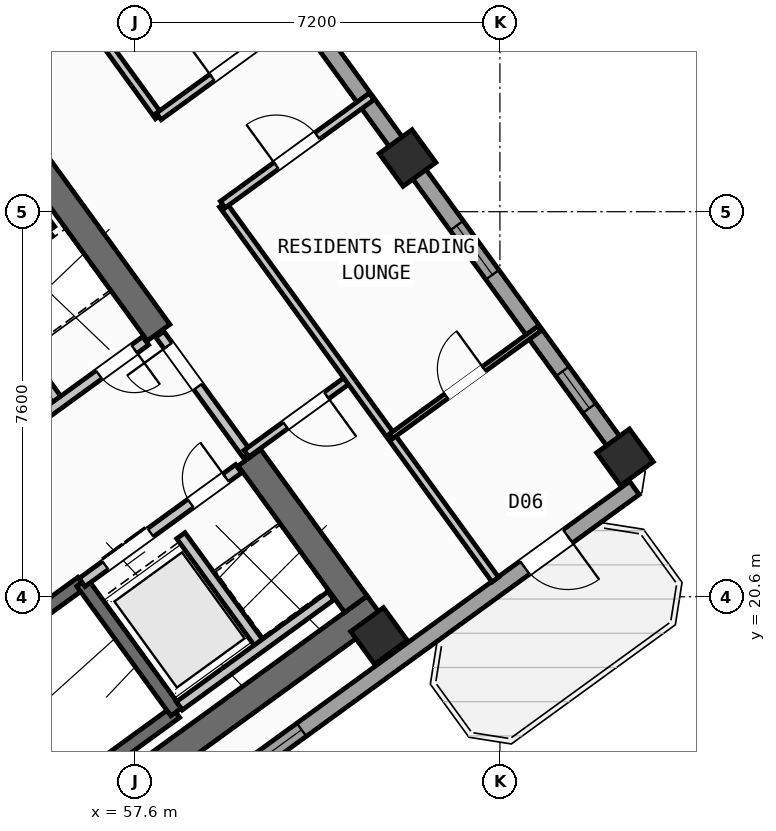
"""IFC4 building model, lengths in metres.
Left out: names, types, materials, properties, quantities, classifications, styles, units other than length and angle.
Written with IfcOpenShell. Run it as: python <this file> out.ifc"""

import sys

from ifc_helpers import new_model, si_unit, direction, frame, frame_2d, origin, origin_2d, place, context, subcontext, project, spatial, rectangle, hollow_rectangle, extrude, source, transform, mapped, element, fill, save


model = new_model("IFC4")
c1 = context("Model", 3, precision=1e-05, world=origin(), true_north=direction((0.0, 1.0)))
c2 = subcontext(c1, "Body", "Model", "MODEL_VIEW")
j1 = project(units=[si_unit("LENGTHUNIT", "METRE"), si_unit("PLANEANGLEUNIT", "RADIAN")], contexts=[c1])
p1 = place(None, origin())
s1 = spatial("IfcSite", under=j1, at=p1, CompositionType="ELEMENT")
p2 = place(p1, origin())
s2 = spatial("IfcBuilding", under=s1, at=p2, CompositionType="ELEMENT")
p3 = place(p2, frame((0.0, 0.0, 184.2)))
s3 = spatial("IfcBuildingStorey", under=s2, at=p3, CompositionType="ELEMENT", Elevation=184.2)
p4 = place(p3, frame((52.359, 13.14, 0.0), z_axis=(0.0, 0.0, 1.0), x_axis=(0.809014896919, 0.587788139183, 0.0)))
e1 = element("IfcWall", 1, at=p4, inside=s3, PredefinedType="SHEAR", context=c2, shape_type="SweptSolid", body=[
    extrude(rectangle(XDim=12.34, YDim=0.55, at=frame_2d((6.17, 0.0))), origin(), (0.0, 0.0, 1.0), 3.35),
])
p5 = place(p3, frame((61.958, 20.454, 0.0), z_axis=(0.0, 0.0, 1.0), x_axis=(-0.587802113096, 0.809004744015, 0.0)))
e2 = element("IfcWall", 2, at=p5, inside=s3, PredefinedType="SHEAR", context=c2, shape_type="SweptSolid", body=[
    extrude(rectangle(XDim=3.575, YDim=0.55, at=frame_2d((1.788, 0.0))), origin(), (0.0, 0.0, 1.0), 3.35),
])
p6 = place(p3, frame((58.064, 25.813, 0.0), z_axis=(0.0, 0.0, 1.0), x_axis=(-0.587764933797, 0.809031756236, 0.0)))
e3 = element("IfcWall", 3, at=p6, inside=s3, PredefinedType="SHEAR", context=c2, shape_type="SweptSolid", body=[
    extrude(rectangle(XDim=6.425, YDim=0.55, at=frame_2d((3.212, 0.0))), origin(), (0.0, 0.0, 1.0), 3.35),
])
m1 = source(origin(), c2, "Body", "SweptSolid", [
    extrude(hollow_rectangle(XDim=0.8, YDim=0.8, WallThickness=0.032, at=origin_2d()), origin(), (0.0, 0.0, 1.0), 3.6),
])
for number, where, z_axis, x_axis in (
    (4, (62.414, 19.827, 0.0), (0.0, 0.0, 1.0), (0.809, 0.588, 0.0)),
    (5, (67.268, 23.354, 0.0), (0.0, 0.0, 1.0), (0.809, 0.588, 0.0)),
    (6, (62.977, 29.259, 0.0), (0.0, 0.0, 1.0), (0.809, 0.588, 0.0)),
):
    element("IfcColumn", number, at=place(p3, frame(where, z_axis=z_axis, x_axis=x_axis)), inside=s3, PredefinedType="COLUMN", context=c2, shape_type="MappedRepresentation", body=[
        mapped(m1, transform((0.0, 0.0, 0.0), scale=1.0)),
    ])
p7 = place(p3, frame((54.81, 40.5, 0.0), z_axis=(0.0, 0.0, 1.0), x_axis=(0.587783625747, -0.809018176127, 0.0)))
e7 = element("IfcWall", 7, at=p7, inside=s3, PredefinedType="STANDARD", context=c2, shape_type="SweptSolid", body=[
    extrude(rectangle(XDim=21.587, YDim=0.32, at=frame_2d((10.794, 0.0))), origin(), (0.0, 0.0, 1.0), 2.825),
])
p8 = place(p7, frame((1.328, 0.0, 0.85)))
e8 = element("IfcOpeningElement", 8, at=p8, cuts=e7, PredefinedType="OPENING", context=c2, shape_type="SweptSolid", body=[
    extrude(rectangle(XDim=1.8, YDim=1.5, at=frame_2d((0.9, 0.75))), frame((0.0, 0.17, 0.0), z_axis=(0.0, -1.0, 0.0), x_axis=(1.0, 0.0, 0.0)), (0.0, 0.0, 1.0), 0.34),
])
p9 = place(p7, frame((4.695, 0.0, 1.0)))
e9 = element("IfcOpeningElement", 9, at=p9, cuts=e7, PredefinedType="OPENING", context=c2, shape_type="SweptSolid", body=[
    extrude(rectangle(XDim=0.9, YDim=1.25, at=frame_2d((0.45, 0.625))), frame((0.0, 0.17, 0.0), z_axis=(0.0, -1.0, 0.0), x_axis=(1.0, 0.0, 0.0)), (0.0, 0.0, 1.0), 0.34),
])
p10 = place(p7, frame((7.829, 0.0, 0.85)))
e10 = element("IfcOpeningElement", 10, at=p10, cuts=e7, PredefinedType="OPENING", context=c2, shape_type="SweptSolid", body=[
    extrude(rectangle(XDim=1.5, YDim=1.5, at=frame_2d((0.75, 0.75))), frame((0.0, 0.17, 0.0), z_axis=(0.0, -1.0, 0.0), x_axis=(1.0, 0.0, 0.0)), (0.0, 0.0, 1.0), 0.34),
])
p11 = place(p7, frame((15.542, 0.0, 0.95)))
e11 = element("IfcOpeningElement", 11, at=p11, cuts=e7, PredefinedType="OPENING", context=c2, shape_type="SweptSolid", body=[
    extrude(rectangle(XDim=1.2, YDim=1.4, at=frame_2d((0.6, 0.7))), frame((0.0, 0.17, 0.0), z_axis=(0.0, -1.0, 0.0), x_axis=(1.0, 0.0, 0.0)), (0.0, 0.0, 1.0), 0.34),
])
p12 = place(p7, frame((19.097, 0.0, 1.0)))
e12 = element("IfcOpeningElement", 12, at=p12, cuts=e7, PredefinedType="OPENING", context=c2, shape_type="SweptSolid", body=[
    extrude(rectangle(XDim=0.9, YDim=1.25, at=frame_2d((0.45, 0.625))), frame((0.0, 0.17, 0.0), z_axis=(0.0, -1.0, 0.0), x_axis=(1.0, 0.0, 0.0)), (0.0, 0.0, 1.0), 0.34),
])
p13 = place(p3, frame((67.454, 22.747, 0.0), z_axis=(0.0, 0.0, 1.0), x_axis=(-0.809021120468, -0.587779573171, 0.0)))
e13 = element("IfcWall", 13, at=p13, inside=s3, PredefinedType="STANDARD", context=c2, shape_type="SweptSolid", body=[
    extrude(rectangle(XDim=17.588, YDim=0.32, at=frame_2d((8.794, 0.0))), origin(), (0.0, 0.0, 1.0), 3.35),
])
p14 = place(p13, frame((1.624, 0.0, 0.0)))
e14 = element("IfcOpeningElement", 14, at=p14, cuts=e13, PredefinedType="OPENING", context=c2, shape_type="SweptSolid", body=[
    extrude(rectangle(XDim=1.05, YDim=2.15, at=frame_2d((0.525, 1.075))), frame((0.0, 0.17, 0.0), z_axis=(0.0, -1.0, 0.0), x_axis=(1.0, 0.0, 0.0)), (0.0, 0.0, 1.0), 0.34),
])
p15 = place(p13, frame((8.119, 0.0, 0.8)))
e15 = element("IfcOpeningElement", 15, at=p15, cuts=e13, PredefinedType="OPENING", context=c2, shape_type="SweptSolid", body=[
    extrude(rectangle(XDim=2.1, YDim=1.55, at=frame_2d((1.05, 0.775))), frame((0.0, 0.17, 0.0), z_axis=(0.0, -1.0, 0.0), x_axis=(1.0, 0.0, 0.0)), (0.0, 0.0, 1.0), 0.34),
])
p16 = place(p13, frame((13.369, 0.0, 0.8)))
e16 = element("IfcOpeningElement", 16, at=p16, cuts=e13, PredefinedType="OPENING", context=c2, shape_type="SweptSolid", body=[
    extrude(rectangle(XDim=2.1, YDim=1.55, at=frame_2d((1.05, 0.775))), frame((0.0, 0.17, 0.0), z_axis=(0.0, -1.0, 0.0), x_axis=(1.0, 0.0, 0.0)), (0.0, 0.0, 1.0), 0.34),
])
p17 = place(p3, frame((49.863, 23.44, 0.0), z_axis=(0.0, 0.0, 1.0), x_axis=(0.809003474932, 0.587803859759, 0.0)))
e17 = element("IfcWall", 17, at=p17, inside=s3, PredefinedType="SHEAR", context=c2, shape_type="SweptSolid", body=[
    extrude(rectangle(XDim=7.46, YDim=0.26, at=frame_2d((3.73, 0.0))), origin(), (0.0, 0.0, 1.0), 3.35),
])
p18 = place(p17, frame((0.36, 0.0, 0.0)))
e18 = element("IfcOpeningElement", 18, at=p18, cuts=e17, PredefinedType="OPENING", context=c2, shape_type="SweptSolid", body=[
    extrude(rectangle(XDim=0.86, YDim=2.05, at=frame_2d((0.43, 1.025))), frame((0.0, 0.14, 0.0), z_axis=(0.0, -1.0, 0.0), x_axis=(1.0, 0.0, 0.0)), (0.0, 0.0, 1.0), 0.28),
])
p19 = place(p3, frame((55.906, 27.831, 0.0), z_axis=(0.0, 0.0, 1.0), x_axis=(-0.587804123638, 0.809003283204, 0.0)))
e19 = element("IfcWall", 19, at=p19, inside=s3, PredefinedType="SHEAR", context=c2, shape_type="SweptSolid", body=[
    extrude(rectangle(XDim=3.16, YDim=0.26, at=frame_2d((1.58, 0.0))), origin(), (0.0, 0.0, 1.0), 3.35),
])
p20 = place(p3, frame((52.472, 14.013, 0.0), z_axis=(0.0, 0.0, 1.0), x_axis=(0.809028366311, 0.587769599847, 0.0)))
e20 = element("IfcWall", 20, at=p20, inside=s3, PredefinedType="SHEAR", context=c2, shape_type="SweptSolid", body=[
    extrude(rectangle(XDim=7.33, YDim=0.26, at=frame_2d((3.665, 0.0))), origin(), (0.0, 0.0, 1.0), 3.35),
])
p21 = place(p3, frame((50.615, 16.57, 0.0), z_axis=(0.0, 0.0, 1.0), x_axis=(0.809028366311, 0.587769599847, 0.0)))
e21 = element("IfcWall", 21, at=p21, inside=s3, PredefinedType="SHEAR", context=c2, shape_type="SweptSolid", body=[
    extrude(rectangle(XDim=7.33, YDim=0.26, at=frame_2d((3.665, 0.0))), origin(), (0.0, 0.0, 1.0), 3.35),
])
p22 = place(p21, frame((0.22, 0.0, 0.0)))
e22 = element("IfcOpeningElement", 22, at=p22, cuts=e21, PredefinedType="OPENING", context=c2, shape_type="SweptSolid", body=[
    extrude(rectangle(XDim=1.1, YDim=2.1, at=frame_2d((0.55, 1.05))), frame((0.0, 0.14, 0.0), z_axis=(0.0, -1.0, 0.0), x_axis=(1.0, 0.0, 0.0)), (0.0, 0.0, 1.0), 0.28),
])
p23 = place(p3, frame((58.41, 18.327, 0.0), z_axis=(0.0, 0.0, 1.0), x_axis=(-0.58776738483, 0.809029975545, 0.0)))
e23 = element("IfcWall", 23, at=p23, inside=s3, PredefinedType="SHEAR", context=c2, shape_type="SweptSolid", body=[
    extrude(rectangle(XDim=3.16, YDim=0.26, at=frame_2d((1.58, 0.0))), origin(), (0.0, 0.0, 1.0), 3.35),
])
p24 = place(p3, frame((56.553, 20.884, 0.0), z_axis=(0.0, 0.0, 1.0), x_axis=(0.809023564264, 0.58777620951, 0.0)))
e24 = element("IfcWall", 24, at=p24, inside=s3, PredefinedType="STANDARD", context=c2, shape_type="SweptSolid", body=[
    extrude(rectangle(XDim=3.818, YDim=0.2, at=frame_2d((1.909, 0.0))), origin(), (0.0, 0.0, 1.0), 3.34),
])
p25 = place(p24, frame((0.57, 0.0, 0.0)))
e25 = element("IfcOpeningElement", 25, at=p25, cuts=e24, PredefinedType="OPENING", context=c2, shape_type="SweptSolid", body=[
    extrude(rectangle(XDim=1.1, YDim=2.15, at=frame_2d((0.55, 1.075))), frame((0.0, 0.11, 0.0), z_axis=(0.0, -1.0, 0.0), x_axis=(1.0, 0.0, 0.0)), (0.0, 0.0, 1.0), 0.22),
])
p26 = place(p24, frame((2.65, 0.0, 0.0)))
e26 = element("IfcOpeningElement", 26, at=p26, cuts=e24, PredefinedType="OPENING", context=c2, shape_type="SweptSolid", body=[
    extrude(rectangle(XDim=0.86, YDim=2.05, at=frame_2d((0.43, 1.025))), frame((0.0, 0.11, 0.0), z_axis=(0.0, -1.0, 0.0), x_axis=(1.0, 0.0, 0.0)), (0.0, 0.0, 1.0), 0.22),
])
p27 = place(p3, frame((60.067, 19.655, 0.0), z_axis=(0.0, 0.0, 1.0), x_axis=(-0.587800520745, 0.809005900975, 0.0)))
e27 = element("IfcWall", 27, at=p27, inside=s3, PredefinedType="STANDARD", context=c2, shape_type="SweptSolid", body=[
    extrude(rectangle(XDim=2.66, YDim=0.2, at=frame_2d((1.33, 0.0))), origin(), (0.0, 0.0, 1.0), 3.34),
])
p28 = place(p3, frame((58.472, 18.447, 0.0), z_axis=(0.0, 0.0, 1.0), x_axis=(0.809018631237, 0.587782999339, 0.0)))
e28 = element("IfcWall", 28, at=p28, inside=s3, PredefinedType="STANDARD", context=c2, shape_type="SweptSolid", body=[
    extrude(rectangle(XDim=3.698, YDim=0.2, at=frame_2d((1.849, 0.0))), origin(), (0.0, 0.0, 1.0), 3.34),
])
p29 = place(p3, frame((56.111, 24.419, 0.0), z_axis=(0.0, 0.0, 1.0), x_axis=(-0.58777848983, 0.809021907548, 0.0)))
e29 = element("IfcWall", 29, at=p29, inside=s3, PredefinedType="STANDARD", context=c2, shape_type="SweptSolid", body=[
    extrude(rectangle(XDim=2.88, YDim=0.2, at=frame_2d((1.44, 0.0))), origin(), (0.0, 0.0, 1.0), 3.34),
])
p30 = place(p3, frame((53.425, 22.468, 0.0), z_axis=(0.0, 0.0, 1.0), x_axis=(0.809024377198, 0.587775090574, 0.0)))
e30 = element("IfcWall", 30, at=p30, inside=s3, PredefinedType="STANDARD", context=c2, shape_type="SweptSolid", body=[
    extrude(rectangle(XDim=5.418, YDim=0.2, at=frame_2d((2.709, 0.0))), origin(), (0.0, 0.0, 1.0), 3.34),
])
p31 = place(p30, frame((4.28, 0.0, 0.0)))
e31 = element("IfcOpeningElement", 31, at=p31, cuts=e30, PredefinedType="OPENING", context=c2, shape_type="SweptSolid", body=[
    extrude(rectangle(XDim=0.86, YDim=2.05, at=frame_2d((0.43, 1.025))), frame((0.0, 0.11, 0.0), z_axis=(0.0, -1.0, 0.0), x_axis=(1.0, 0.0, 0.0)), (0.0, 0.0, 1.0), 0.22),
])
p32 = place(p30, frame((1.45, 0.0, 0.0)))
e32 = element("IfcOpeningElement", 32, at=p32, cuts=e30, PredefinedType="OPENING", context=c2, shape_type="SweptSolid", body=[
    extrude(rectangle(XDim=0.86, YDim=2.05, at=frame_2d((0.43, 1.025))), frame((0.0, 0.11, 0.0), z_axis=(0.0, -1.0, 0.0), x_axis=(1.0, 0.0, 0.0)), (0.0, 0.0, 1.0), 0.22),
])
p33 = place(p3, frame((59.827, 23.386, 0.0), z_axis=(0.0, 0.0, 1.0), x_axis=(-0.587803840107, 0.809003489211, 0.0)))
e33 = element("IfcWall", 33, at=p33, inside=s3, PredefinedType="STANDARD", context=c2, shape_type="SweptSolid", body=[
    extrude(rectangle(XDim=2.96, YDim=0.2, at=frame_2d((1.48, 0.0))), origin(), (0.0, 0.0, 1.0), 3.34),
])
p34 = place(p33, frame((1.68, 0.0, 0.0)))
e34 = element("IfcOpeningElement", 34, at=p34, cuts=e33, PredefinedType="OPENING", context=c2, shape_type="SweptSolid", body=[
    extrude(rectangle(XDim=1.0, YDim=2.1, at=frame_2d((0.5, 1.05))), frame((0.0, 0.11, 0.0), z_axis=(0.0, -1.0, 0.0), x_axis=(1.0, 0.0, 0.0)), (0.0, 0.0, 1.0), 0.22),
])
p35 = place(p3, frame((59.798, 23.427, 0.0), z_axis=(0.0, 0.0, 1.0), x_axis=(0.809034604122, 0.587761013791, 0.0)))
e35 = element("IfcWall", 35, at=p35, inside=s3, PredefinedType="PARTITIONING", context=c2, shape_type="SweptSolid", body=[
    extrude(rectangle(XDim=2.51, YDim=0.16, at=frame_2d((1.255, 0.0))), origin(), (0.0, 0.0, 1.0), 3.34),
])
p36 = place(p35, frame((0.95, 0.0, 0.0)))
e36 = element("IfcOpeningElement", 36, at=p36, cuts=e35, PredefinedType="OPENING", context=c2, shape_type="SweptSolid", body=[
    extrude(rectangle(XDim=1.0, YDim=2.1, at=frame_2d((0.5, 1.05))), frame((0.0, 0.09, 0.0), z_axis=(0.0, -1.0, 0.0), x_axis=(1.0, 0.0, 0.0)), (0.0, 0.0, 1.0), 0.18),
])
p37 = place(p3, frame((64.709, 20.938, 0.0), z_axis=(0.0, 0.0, 1.0), x_axis=(-0.587776590479, 0.80902328748, 0.0)))
e37 = element("IfcWall", 37, at=p37, inside=s3, PredefinedType="PARTITIONING", context=c2, shape_type="SweptSolid", body=[
    extrude(rectangle(XDim=9.15, YDim=0.16, at=frame_2d((4.575, 0.0))), origin(), (0.0, 0.0, 1.0), 3.34),
])
p38 = place(p3, frame((58.067, 30.08, 0.0), z_axis=(0.0, 0.0, 1.0), x_axis=(-0.587787785243, 0.809015154073, 0.0)))
e38 = element("IfcWall", 38, at=p38, inside=s3, PredefinedType="PARTITIONING", context=c2, shape_type="SweptSolid", body=[
    extrude(rectangle(XDim=10.4, YDim=0.16, at=frame_2d((5.2, 0.0))), origin(), (0.0, 0.0, 1.0), 3.34),
])
p39 = place(p3, frame((59.331, 28.341, 0.0), z_axis=(0.0, 0.0, 1.0), x_axis=(0.809003564202, 0.587803736896, 0.0)))
e39 = element("IfcWall", 39, at=p39, inside=s3, PredefinedType="PARTITIONING", context=c2, shape_type="SweptSolid", body=[
    extrude(rectangle(XDim=3.63, YDim=0.16, at=frame_2d((1.815, 0.0))), origin(), (0.0, 0.0, 1.0), 3.34),
])
p40 = place(p39, frame((1.305, 0.0, 0.0)))
e40 = element("IfcOpeningElement", 40, at=p40, cuts=e39, PredefinedType="OPENING", context=c2, shape_type="SweptSolid", body=[
    extrude(rectangle(XDim=1.0, YDim=2.1, at=frame_2d((0.5, 1.05))), frame((0.0, 0.09, 0.0), z_axis=(0.0, -1.0, 0.0), x_axis=(1.0, 0.0, 0.0)), (0.0, 0.0, 1.0), 0.18),
])
p41 = place(p3, frame((58.067, 30.08, 0.0), z_axis=(0.0, 0.0, 1.0), x_axis=(0.809012309495, 0.587791700422, 0.0)))
e41 = element("IfcWall", 41, at=p41, inside=s3, PredefinedType="PARTITIONING", context=c2, shape_type="SweptSolid", body=[
    extrude(rectangle(XDim=3.63, YDim=0.16, at=frame_2d((1.815, 0.0))), origin(), (0.0, 0.0, 1.0), 3.34),
])
p42 = place(p41, frame((1.305, 0.0, 0.0)))
e42 = element("IfcOpeningElement", 42, at=p42, cuts=e41, PredefinedType="OPENING", context=c2, shape_type="SweptSolid", body=[
    extrude(rectangle(XDim=1.0, YDim=2.1, at=frame_2d((0.5, 1.05))), frame((0.0, 0.09, 0.0), z_axis=(0.0, -1.0, 0.0), x_axis=(1.0, 0.0, 0.0)), (0.0, 0.0, 1.0), 0.18),
])
p43 = place(p3, frame((62.653, 23.768, 0.0), z_axis=(0.0, 0.0, 1.0), x_axis=(0.809037198293, 0.58775744298, 0.0)))
e43 = element("IfcWall", 43, at=p43, inside=s3, PredefinedType="PARTITIONING", context=c2, shape_type="SweptSolid", body=[
    extrude(rectangle(XDim=3.61, YDim=0.11, at=frame_2d((1.805, 0.0))), origin(), (0.0, 0.0, 1.0), 3.34),
])
p44 = place(p43, frame((1.345, 0.0, 0.0)))
e44 = element("IfcOpeningElement", 44, at=p44, cuts=e43, PredefinedType="OPENING", context=c2, shape_type="SweptSolid", body=[
    extrude(rectangle(XDim=0.92, YDim=2.08, at=frame_2d((0.46, 1.04))), frame((0.0, 0.065, 0.0), z_axis=(0.0, -1.0, 0.0), x_axis=(1.0, 0.0, 0.0)), (0.0, 0.0, 1.0), 0.13),
])
m2 = source(origin(), c2, "Body", "SweptSolid", [
    extrude(rectangle(XDim=1.05, YDim=2.15, at=frame_2d((0.525, 1.075))), frame((0.0, 0.025, 0.0), z_axis=(0.0, -1.0, 0.0), x_axis=(1.0, 0.0, 0.0)), (0.0, 0.0, 1.0), 0.05),
])
p45 = place(p14, origin())
e45 = element("IfcDoor", 45, at=p45, inside=s3, OperationType="SINGLE_SWING_LEFT", PredefinedType="DOOR", context=c2, shape_type="MappedRepresentation", body=[
    mapped(m2, transform((0.0, 0.0, 0.0), scale=1.0)),
])
fill(e14, e45)
m3 = source(origin(), c2, "Body", "SweptSolid", [
    extrude(rectangle(XDim=1.2, YDim=1.4, at=frame_2d((0.6, 0.7))), frame((0.0, 0.03, 0.0), z_axis=(0.0, -1.0, 0.0), x_axis=(1.0, 0.0, 0.0)), (0.0, 0.0, 1.0), 0.06),
])
p46 = place(p11, origin())
e46 = element("IfcWindow", 46, at=p46, inside=s3, PartitioningType="SINGLE_PANEL", PredefinedType="WINDOW", context=c2, shape_type="MappedRepresentation", body=[
    mapped(m3, transform((0.0, 0.0, 0.0), scale=1.0)),
])
fill(e11, e46)
m4 = source(origin(), c2, "Body", "SweptSolid", [
    extrude(rectangle(XDim=0.9, YDim=1.25, at=frame_2d((0.45, 0.625))), frame((0.0, 0.03, 0.0), z_axis=(0.0, -1.0, 0.0), x_axis=(1.0, 0.0, 0.0)), (0.0, 0.0, 1.0), 0.06),
])
p47 = place(p12, origin())
e47 = element("IfcWindow", 47, at=p47, inside=s3, PartitioningType="SINGLE_PANEL", PredefinedType="WINDOW", context=c2, shape_type="MappedRepresentation", body=[
    mapped(m4, transform((0.0, 0.0, 0.0), scale=1.0)),
])
fill(e12, e47)
m5 = source(origin(), c2, "Body", "SweptSolid", [
    extrude(rectangle(XDim=2.1, YDim=1.55, at=frame_2d((1.05, 0.775))), frame((0.0, 0.03, 0.0), z_axis=(0.0, -1.0, 0.0), x_axis=(1.0, 0.0, 0.0)), (0.0, 0.0, 1.0), 0.06),
])
p48 = place(p15, origin())
e48 = element("IfcWindow", 48, at=p48, inside=s3, PartitioningType="SINGLE_PANEL", PredefinedType="WINDOW", context=c2, shape_type="MappedRepresentation", body=[
    mapped(m5, transform((0.0, 0.0, 0.0), scale=1.0)),
])
fill(e15, e48)
m6 = source(origin(), c2, "Body", "SweptSolid", [
    extrude(rectangle(XDim=1.1, YDim=2.15, at=frame_2d((0.55, 1.075))), frame((0.0, 0.025, 0.0), z_axis=(0.0, -1.0, 0.0), x_axis=(1.0, 0.0, 0.0)), (0.0, 0.0, 1.0), 0.05),
])
p49 = place(p25, origin())
e49 = element("IfcDoor", 49, at=p49, inside=s3, OperationType="DOUBLE_DOOR_SLIDING", PredefinedType="DOOR", context=c2, shape_type="MappedRepresentation", body=[
    mapped(m6, transform((0.0, 0.0, 0.0), scale=1.0)),
])
fill(e25, e49)
m7 = source(origin(), c2, "Body", "SweptSolid", [
    extrude(rectangle(XDim=0.86, YDim=2.05, at=frame_2d((0.43, 1.025))), frame((0.0, 0.025, 0.0), z_axis=(0.0, -1.0, 0.0), x_axis=(1.0, 0.0, 0.0)), (0.0, 0.0, 1.0), 0.05),
])
p50 = place(p26, origin())
e50 = element("IfcDoor", 50, at=p50, inside=s3, OperationType="SINGLE_SWING_RIGHT", PredefinedType="DOOR", context=c2, shape_type="MappedRepresentation", body=[
    mapped(m7, transform((0.0, 0.0, 0.0), scale=1.0)),
])
fill(e26, e50)
p51 = place(p31, frame((0.86, 0.0, 0.0), z_axis=(0.0, 0.0, 1.0), x_axis=(-1.0, 0.0, 0.0)))
e51 = element("IfcDoor", 51, at=p51, inside=s3, OperationType="SINGLE_SWING_LEFT", PredefinedType="DOOR", context=c2, shape_type="MappedRepresentation", body=[
    mapped(m7, transform((0.0, 0.0, 0.0), scale=1.0)),
])
fill(e31, e51)
m8 = source(origin(), c2, "Body", "SweptSolid", [
    extrude(rectangle(XDim=1.0, YDim=2.1, at=frame_2d((0.5, 1.05))), frame((0.0, 0.025, 0.0), z_axis=(0.0, -1.0, 0.0), x_axis=(1.0, 0.0, 0.0)), (0.0, 0.0, 1.0), 0.05),
])
p52 = place(p36, frame((1.0, 0.0, 0.0), z_axis=(0.0, 0.0, 1.0), x_axis=(-1.0, 0.0, 0.0)))
e52 = element("IfcDoor", 52, at=p52, inside=s3, OperationType="SINGLE_SWING_LEFT", PredefinedType="DOOR", context=c2, shape_type="MappedRepresentation", body=[
    mapped(m8, transform((0.0, 0.0, 0.0), scale=1.0)),
])
fill(e36, e52)
p53 = place(p34, origin())
e53 = element("IfcDoor", 53, at=p53, inside=s3, OperationType="SINGLE_SWING_RIGHT", PredefinedType="DOOR", context=c2, shape_type="MappedRepresentation", body=[
    mapped(m8, transform((0.0, 0.0, 0.0), scale=1.0)),
])
fill(e34, e53)
p54 = place(p42, origin())
e54 = element("IfcDoor", 54, at=p54, inside=s3, OperationType="SINGLE_SWING_LEFT", PredefinedType="DOOR", context=c2, shape_type="MappedRepresentation", body=[
    mapped(m8, transform((0.0, 0.0, 0.0), scale=1.0)),
])
fill(e42, e54)
p55 = place(p40, origin())
e55 = element("IfcDoor", 55, at=p55, inside=s3, OperationType="SINGLE_SWING_LEFT", PredefinedType="DOOR", context=c2, shape_type="MappedRepresentation", body=[
    mapped(m8, transform((0.0, 0.0, 0.0), scale=1.0)),
])
fill(e40, e55)
m9 = source(origin(), c2, "Body", "SweptSolid", [
    extrude(rectangle(XDim=0.92, YDim=2.08, at=frame_2d((0.46, 1.04))), frame((0.0, 0.025, 0.0), z_axis=(0.0, -1.0, 0.0), x_axis=(1.0, 0.0, 0.0)), (0.0, 0.0, 1.0), 0.05),
])
p56 = place(p44, origin())
e56 = element("IfcDoor", 56, at=p56, inside=s3, OperationType="SINGLE_SWING_RIGHT", PredefinedType="DOOR", context=c2, shape_type="MappedRepresentation", body=[
    mapped(m9, transform((0.0, 0.0, 0.0), scale=1.0)),
])
fill(e44, e56)
save(model, sys.argv[1])
